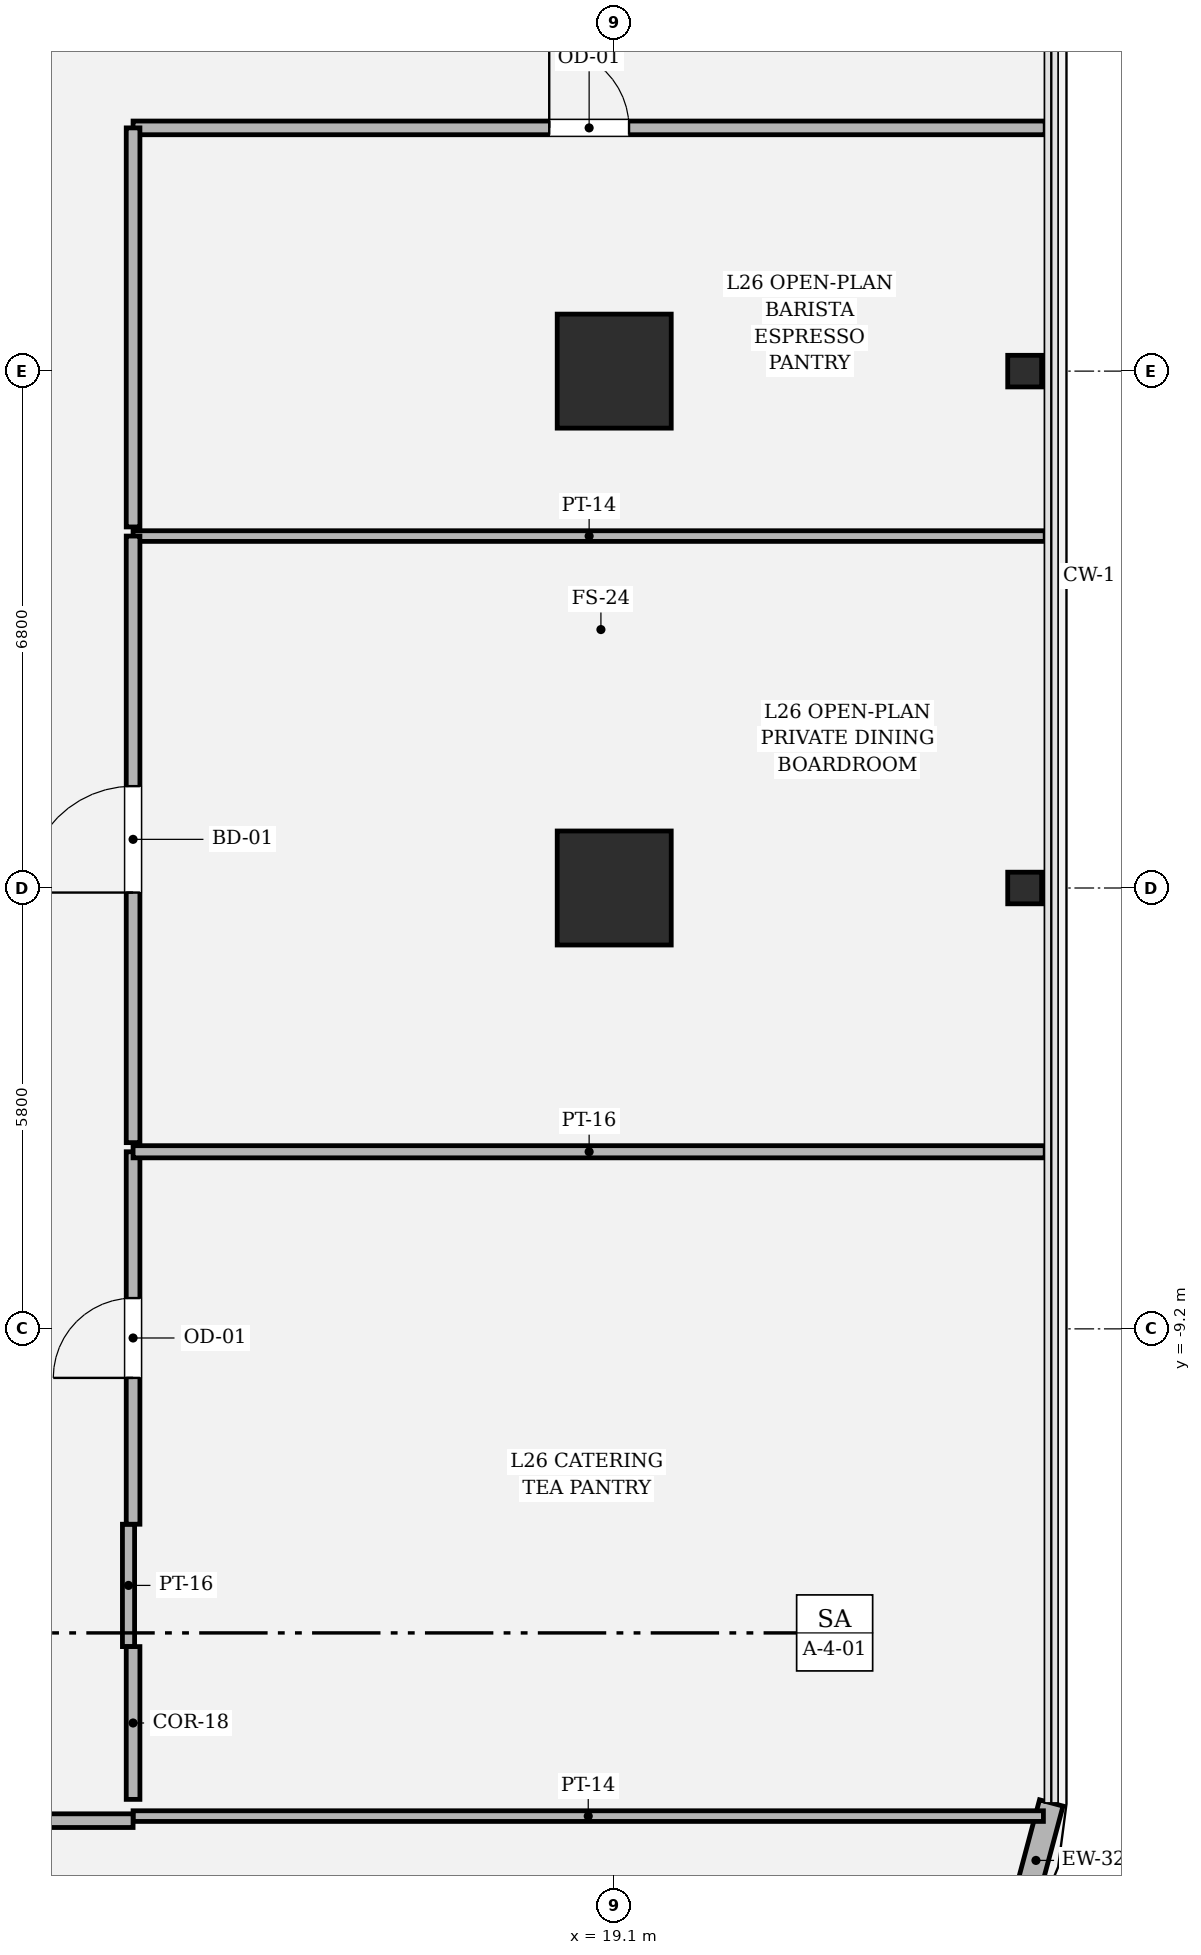
"""IFC4 building model, lengths in metres.
Left out: names, types, materials, properties, quantities, classifications, styles, units other than length and angle.
Written with IfcOpenShell. Run it as: python <this file> out.ifc"""

import sys

from ifc_helpers import new_model, si_unit, direction, frame, frame_2d, origin, origin_2d, place, context, subcontext, project, spatial, rectangle, hollow_rectangle, i_section, extrude, element, fill, save


model = new_model("IFC4")
c1 = context("Model", 3, precision=1e-05, world=origin(), true_north=direction((0.0, 1.0)))
c2 = subcontext(c1, "Body", "Model", "MODEL_VIEW")
j1 = project(units=[si_unit("LENGTHUNIT", "METRE"), si_unit("PLANEANGLEUNIT", "RADIAN")], contexts=[c1])
p1 = place(None, origin())
s1 = spatial("IfcSite", under=j1, at=p1, CompositionType="ELEMENT")
p2 = place(p1, origin())
s2 = spatial("IfcBuilding", under=s1, at=p2, CompositionType="ELEMENT")
p3 = place(p2, frame((0.0, 0.0, 113.25)))
s3 = spatial("IfcBuildingStorey", under=s2, at=p3, CompositionType="ELEMENT", Elevation=113.25)
for number, where, z_axis, x_axis in (
    (1, (19.1, -3.4, 0.0), (0.0, 0.0, 1.0), (1.0, 0.0, 0.0)),
    (2, (19.1, 3.4, 0.0), (0.0, 0.0, 1.0), (1.0, 0.0, 0.0)),
):
    element("IfcColumn", number, at=place(p3, frame(where, z_axis=z_axis, x_axis=x_axis)), inside=s3, PredefinedType="COLUMN", context=c2, shape_type="SweptSolid", body=[
        extrude(hollow_rectangle(XDim=1.5, YDim=1.5, WallThickness=0.045, at=origin_2d()), origin(), (0.0, 0.0, 1.0), 4.05),
    ])
for number, where, z_axis, x_axis in (
    (3, (24.5, -3.4, 0.0), (0.0, 0.0, 1.0), (0.0, 1.0, 0.0)),
    (4, (24.5, 3.4, 0.0), (0.0, 0.0, 1.0), (0.0, 1.0, 0.0)),
):
    element("IfcColumn", number, at=place(p3, frame(where, z_axis=z_axis, x_axis=x_axis)), inside=s3, PredefinedType="COLUMN", context=c2, shape_type="SweptSolid", body=[
        extrude(i_section(OverallWidth=0.416, OverallDepth=0.446, WebThickness=0.039, FlangeThickness=0.062, FilletRadius=0.018, at=origin_2d()), origin(), (0.0, 0.0, 1.0), 4.048),
    ])
p4 = place(p3, frame((24.447, -16.949, 0.0), z_axis=(0.0, 0.0, 1.0), x_axis=(0.257847112249, 0.966185730957, 0.0)))
e5 = element("IfcWall", 5, at=p4, inside=s3, PredefinedType="SOLIDWALL", context=c2, shape_type="SweptSolid", body=[
    extrude(rectangle(XDim=1.565, YDim=0.32, at=frame_2d((0.783, 0.0))), origin(), (0.0, 0.0, 1.0), 2.524),
])
p5 = place(p3, frame((12.77, -15.61, 0.0), z_axis=(0.0, 0.0, 1.0), x_axis=(1.0, 0.0, 0.0)))
e6 = element("IfcWall", 6, at=p5, inside=s3, PredefinedType="PARTITIONING", context=c2, shape_type="SweptSolid", body=[
    extrude(rectangle(XDim=11.977, YDim=0.14, at=frame_2d((5.988, 0.0))), origin(), (0.0, 0.0, 1.0), 2.524),
])
p6 = place(p3, frame((2.46, -15.67, 0.0), z_axis=(0.0, 0.0, 1.0), x_axis=(1.0, 0.0, 0.0)))
e7 = element("IfcWall", 7, at=p6, inside=s3, PredefinedType="PARTITIONING", context=c2, shape_type="SweptSolid", body=[
    extrude(rectangle(XDim=10.31, YDim=0.18, at=frame_2d((5.155, 0.0))), origin(), (0.0, 0.0, 1.0), 3.104),
])
p7 = place(p6, frame((4.63, 0.0, 0.0)))
e8 = element("IfcOpeningElement", 8, at=p7, cuts=e7, PredefinedType="OPENING", context=c2, shape_type="SweptSolid", body=[
    extrude(rectangle(XDim=1.05, YDim=2.2, at=frame_2d((0.525, 1.1))), frame((0.0, 0.1, 0.0), z_axis=(0.0, -1.0, 0.0), x_axis=(1.0, 0.0, 0.0)), (0.0, 0.0, 1.0), 0.2),
])
p8 = place(p3, frame((12.71, -13.38, 0.0), z_axis=(0.0, 0.0, 1.0), x_axis=(0.0, 1.0, 0.0)))
e9 = element("IfcWall", 9, at=p8, inside=s3, PredefinedType="PARTITIONING", context=c2, shape_type="SweptSolid", body=[
    extrude(rectangle(XDim=1.61, YDim=0.16, at=frame_2d((0.805, 0.0))), origin(), (0.0, 0.0, 1.0), 3.354),
])
p9 = place(p3, frame((12.77, -11.77, 0.0), z_axis=(0.0, 0.0, 1.0), x_axis=(0.0, 1.0, 0.0)))
e10 = element("IfcWall", 10, at=p9, inside=s3, PredefinedType="PARTITIONING", context=c2, shape_type="SweptSolid", body=[
    extrude(rectangle(XDim=4.9, YDim=0.18, at=frame_2d((2.45, 0.0))), origin(), (0.0, 0.0, 1.0), 3.104),
])
p10 = place(p9, frame((1.925, 0.0, 0.0)))
e11 = element("IfcOpeningElement", 11, at=p10, cuts=e10, PredefinedType="OPENING", context=c2, shape_type="SweptSolid", body=[
    extrude(rectangle(XDim=1.05, YDim=2.2, at=frame_2d((0.525, 1.1))), frame((0.0, 0.1, 0.0), z_axis=(0.0, -1.0, 0.0), x_axis=(1.0, 0.0, 0.0)), (0.0, 0.0, 1.0), 0.2),
])
p11 = place(p3, frame((12.77, -6.87, 0.0), z_axis=(0.0, 0.0, 1.0), x_axis=(1.0, 0.0, 0.0)))
e12 = element("IfcWall", 12, at=p11, inside=s3, PredefinedType="PARTITIONING", context=c2, shape_type="SweptSolid", body=[
    extrude(rectangle(XDim=12.0, YDim=0.16, at=frame_2d((6.0, 0.0))), origin(), (0.0, 0.0, 1.0), 2.524),
])
p12 = place(p3, frame((12.77, -15.39, 0.0), z_axis=(0.0, 0.0, 1.0), x_axis=(0.0, 1.0, 0.0)))
e13 = element("IfcWall", 13, at=p12, inside=s3, PredefinedType="PARTITIONING", context=c2, shape_type="SweptSolid", body=[
    extrude(rectangle(XDim=2.01, YDim=0.18, at=frame_2d((1.005, 0.0))), origin(), (0.0, 0.0, 1.0), 3.354),
])
p13 = place(p3, frame((12.77, 1.23, 0.0), z_axis=(0.0, 0.0, 1.0), x_axis=(1.0, 0.0, 0.0)))
e14 = element("IfcWall", 14, at=p13, inside=s3, PredefinedType="PARTITIONING", context=c2, shape_type="SweptSolid", body=[
    extrude(rectangle(XDim=12.0, YDim=0.14, at=frame_2d((6.0, 0.0))), origin(), (0.0, 0.0, 1.0), 2.524),
])
p14 = place(p3, frame((12.77, -6.75, 0.0), z_axis=(0.0, 0.0, 1.0), x_axis=(0.0, 1.0, 0.0)))
e15 = element("IfcWall", 15, at=p14, inside=s3, PredefinedType="PARTITIONING", context=c2, shape_type="SweptSolid", body=[
    extrude(rectangle(XDim=7.98, YDim=0.18, at=frame_2d((3.99, 0.0))), origin(), (0.0, 0.0, 1.0), 3.104),
])
p15 = place(p14, frame((3.29, 0.0, 0.0)))
e16 = element("IfcOpeningElement", 16, at=p15, cuts=e15, PredefinedType="OPENING", context=c2, shape_type="SweptSolid", body=[
    extrude(rectangle(XDim=1.4, YDim=2.25, at=frame_2d((0.7, 1.125))), frame((0.0, 0.1, 0.0), z_axis=(0.0, -1.0, 0.0), x_axis=(1.0, 0.0, 0.0)), (0.0, 0.0, 1.0), 0.2),
])
p16 = place(p3, frame((12.77, 6.6, 0.0), z_axis=(0.0, 0.0, 1.0), x_axis=(1.0, 0.0, 0.0)))
e17 = element("IfcWall", 17, at=p16, inside=s3, PredefinedType="PARTITIONING", context=c2, shape_type="SweptSolid", body=[
    extrude(rectangle(XDim=12.0, YDim=0.18, at=frame_2d((6.0, 0.0))), origin(), (0.0, 0.0, 1.0), 3.104),
])
p17 = place(p16, frame((5.475, 0.0, 0.0)))
e18 = element("IfcOpeningElement", 18, at=p17, cuts=e17, PredefinedType="OPENING", context=c2, shape_type="SweptSolid", body=[
    extrude(rectangle(XDim=1.05, YDim=2.2, at=frame_2d((0.525, 1.1))), frame((0.0, 0.1, 0.0), z_axis=(0.0, -1.0, 0.0), x_axis=(1.0, 0.0, 0.0)), (0.0, 0.0, 1.0), 0.2),
])
p18 = place(p3, frame((12.77, 1.35, 0.0), z_axis=(0.0, 0.0, 1.0), x_axis=(0.0, 1.0, 0.0)))
e19 = element("IfcWall", 19, at=p18, inside=s3, PredefinedType="PARTITIONING", context=c2, shape_type="SweptSolid", body=[
    extrude(rectangle(XDim=5.25, YDim=0.18, at=frame_2d((2.625, 0.0))), origin(), (0.0, 0.0, 1.0), 3.104),
])
p19 = place(p10, origin())
e20 = element("IfcDoor", 20, at=p19, inside=s3, OperationType="SINGLE_SWING_LEFT", PredefinedType="DOOR", context=c2, shape_type="SweptSolid", body=[
    extrude(rectangle(XDim=1.05, YDim=2.2, at=frame_2d((0.525, 1.1))), frame((0.0, 0.025, 0.0), z_axis=(0.0, -1.0, 0.0), x_axis=(1.0, 0.0, 0.0)), (0.0, 0.0, 1.0), 0.05),
])
fill(e11, e20)
p20 = place(p15, origin())
e21 = element("IfcDoor", 21, at=p20, inside=s3, OperationType="SINGLE_SWING_LEFT", PredefinedType="DOOR", context=c2, shape_type="SweptSolid", body=[
    extrude(rectangle(XDim=1.4, YDim=2.25, at=frame_2d((0.7, 1.125))), frame((0.0, 0.025, 0.0), z_axis=(0.0, -1.0, 0.0), x_axis=(1.0, 0.0, 0.0)), (0.0, 0.0, 1.0), 0.05),
])
fill(e16, e21)
p21 = place(p17, origin())
e22 = element("IfcDoor", 22, at=p21, inside=s3, OperationType="SINGLE_SWING_LEFT", PredefinedType="DOOR", context=c2, shape_type="SweptSolid", body=[
    extrude(rectangle(XDim=1.05, YDim=2.2, at=frame_2d((0.525, 1.1))), frame((0.0, 0.025, 0.0), z_axis=(0.0, -1.0, 0.0), x_axis=(1.0, 0.0, 0.0)), (0.0, 0.0, 1.0), 0.05),
])
fill(e18, e22)
save(model, sys.argv[1])
